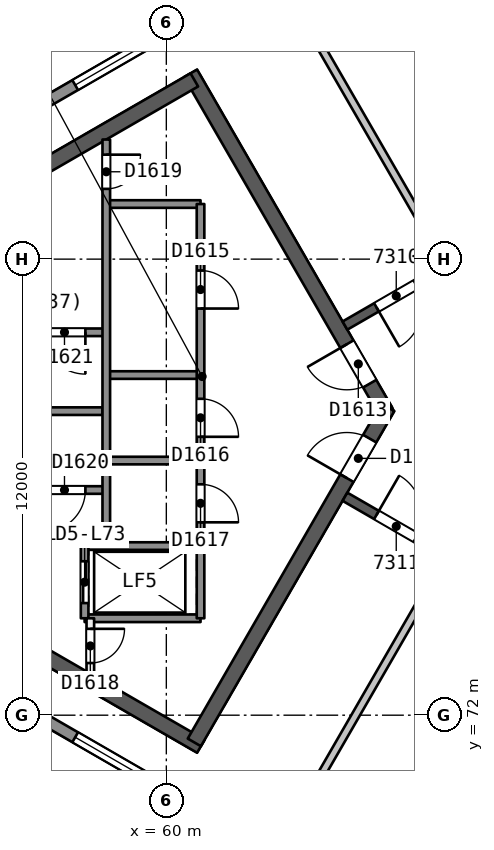
"""IFC4 building model, lengths in metres.
Left out: names, types, materials, properties, quantities, classifications, styles, units other than length and angle.
Written with IfcOpenShell. Run it as: python <this file> out.ifc"""

import sys

from ifc_helpers import new_model, si_unit, direction, frame, frame_2d, origin, place, context, subcontext, project, spatial, rectangle, extrude, element, fill, save


model = new_model("IFC4")
c1 = context("Model", 3, precision=1e-05, world=origin(), true_north=direction((0.0, 1.0)))
c2 = subcontext(c1, "Body", "Model", "MODEL_VIEW")
j1 = project(units=[si_unit("LENGTHUNIT", "METRE"), si_unit("PLANEANGLEUNIT", "RADIAN")], contexts=[c1])
p1 = place(None, origin())
s1 = spatial("IfcSite", under=j1, at=p1, CompositionType="ELEMENT")
p2 = place(p1, origin())
s2 = spatial("IfcBuilding", under=s1, at=p2, CompositionType="ELEMENT")
p3 = place(p2, frame((0.0, 0.0, 296.0)))
s3 = spatial("IfcBuildingStorey", under=s2, at=p3, CompositionType="ELEMENT", Elevation=296.0)
p4 = place(p3, frame((65.769, 80.0, 0.0), z_axis=(0.0, 0.0, 1.0), x_axis=(-0.50000177223, 0.866024380585, 0.0)))
e1 = element("IfcWall", 1, at=p4, inside=s3, PredefinedType="SHEAR", context=c2, shape_type="SweptSolid", body=[
    extrude(rectangle(XDim=10.265, YDim=0.4, at=frame_2d((5.132, 0.0))), origin(), (0.0, 0.0, 1.0), 4.4),
])
p5 = place(p4, frame((0.834, 0.0, 0.0)))
e2 = element("IfcOpeningElement", 2, at=p5, cuts=e1, PredefinedType="OPENING", context=c2, shape_type="SweptSolid", body=[
    extrude(rectangle(XDim=1.2, YDim=2.1, at=frame_2d((0.6, 1.05))), frame((0.0, 0.21, 0.0), z_axis=(0.0, -1.0, 0.0), x_axis=(1.0, 0.0, 0.0)), (0.0, 0.0, 1.0), 0.421),
])
p6 = place(p3, frame((60.737, 88.716, 0.0), z_axis=(0.0, 0.0, 1.0), x_axis=(-0.866028812667, -0.499994095595, 0.0)))
e3 = element("IfcWall", 3, at=p6, inside=s3, PredefinedType="SHEAR", context=c2, shape_type="SweptSolid", body=[
    extrude(rectangle(XDim=14.134, YDim=0.4, at=frame_2d((7.067, 0.0))), origin(), (0.0, 0.0, 1.0), 4.4),
])
p7 = place(p3, frame((48.597, 78.293, 0.0), z_axis=(0.0, 0.0, 1.0), x_axis=(0.866026024469, -0.499998924941, 0.0)))
e4 = element("IfcWall", 4, at=p7, inside=s3, PredefinedType="SHEAR", context=c2, shape_type="SweptSolid", body=[
    extrude(rectangle(XDim=14.218, YDim=0.4, at=frame_2d((7.109, 0.0))), origin(), (0.0, 0.0, 1.0), 4.4),
])
p8 = place(p3, frame((60.737, 71.284, 0.0), z_axis=(0.0, 0.0, 1.0), x_axis=(0.50000547566, 0.866022242388, 0.0)))
e5 = element("IfcWall", 5, at=p8, inside=s3, PredefinedType="SHEAR", context=c2, shape_type="SweptSolid", body=[
    extrude(rectangle(XDim=10.18, YDim=0.4, at=frame_2d((5.09, 0.0))), origin(), (0.0, 0.0, 1.0), 4.4),
])
p9 = place(p8, frame((8.03, 0.0, 0.0)))
e6 = element("IfcOpeningElement", 6, at=p9, cuts=e5, PredefinedType="OPENING", context=c2, shape_type="SweptSolid", body=[
    extrude(rectangle(XDim=1.2, YDim=2.1, at=frame_2d((0.6, 1.05))), frame((0.0, 0.21, 0.0), z_axis=(0.0, -1.0, 0.0), x_axis=(1.0, 0.0, 0.0)), (0.0, 0.0, 1.0), 0.421),
])
p10 = place(p3, frame((78.2, 90.046, 0.0), z_axis=(0.0, 0.0, 1.0), x_axis=(-0.866026492143, -0.499998114903, 0.0)))
e7 = element("IfcWall", 7, at=p10, inside=s3, PredefinedType="SHEAR", context=c2, shape_type="SweptSolid", body=[
    extrude(rectangle(XDim=15.588, YDim=0.25, at=frame_2d((7.794, 0.0))), origin(), (0.0, 0.0, 1.0), 4.0),
])
p11 = place(p10, frame((2.518, 0.0, 0.0)))
e8 = element("IfcOpeningElement", 8, at=p11, cuts=e7, PredefinedType="OPENING", context=c2, shape_type="SweptSolid", body=[
    extrude(rectangle(XDim=1.2, YDim=2.4, at=frame_2d((0.6, 1.2))), frame((0.0, 0.135, 0.0), z_axis=(0.0, -1.0, 0.0), x_axis=(1.0, 0.0, 0.0)), (0.0, 0.0, 1.0), 0.271),
])
p12 = place(p10, frame((7.194, 0.0, 0.0)))
e9 = element("IfcOpeningElement", 9, at=p12, cuts=e7, PredefinedType="OPENING", context=c2, shape_type="SweptSolid", body=[
    extrude(rectangle(XDim=1.2, YDim=2.4, at=frame_2d((0.6, 1.2))), frame((0.0, 0.135, 0.0), z_axis=(0.0, -1.0, 0.0), x_axis=(1.0, 0.0, 0.0)), (0.0, 0.0, 1.0), 0.271),
])
p13 = place(p10, frame((10.312, 0.0, 0.0)))
e10 = element("IfcOpeningElement", 10, at=p13, cuts=e7, PredefinedType="OPENING", context=c2, shape_type="SweptSolid", body=[
    extrude(rectangle(XDim=1.2, YDim=2.4, at=frame_2d((0.6, 1.2))), frame((0.0, 0.135, 0.0), z_axis=(0.0, -1.0, 0.0), x_axis=(1.0, 0.0, 0.0)), (0.0, 0.0, 1.0), 0.271),
])
p14 = place(p10, frame((13.43, 0.0, 0.0)))
e11 = element("IfcOpeningElement", 11, at=p14, cuts=e7, PredefinedType="OPENING", context=c2, shape_type="SweptSolid", body=[
    extrude(rectangle(XDim=1.2, YDim=2.4, at=frame_2d((0.6, 1.2))), frame((0.0, 0.135, 0.0), z_axis=(0.0, -1.0, 0.0), x_axis=(1.0, 0.0, 0.0)), (0.0, 0.0, 1.0), 0.271),
])
p15 = place(p3, frame((64.7, 77.748, 0.0), z_axis=(0.0, 0.0, 1.0), x_axis=(0.866026492143, -0.499998114903, 0.0)))
e12 = element("IfcWall", 12, at=p15, inside=s3, PredefinedType="SHEAR", context=c2, shape_type="SweptSolid", body=[
    extrude(rectangle(XDim=15.588, YDim=0.25, at=frame_2d((7.794, 0.0))), origin(), (0.0, 0.0, 1.0), 4.0),
])
p16 = place(p15, frame((0.959, 0.0, 0.0)))
e13 = element("IfcOpeningElement", 13, at=p16, cuts=e12, PredefinedType="OPENING", context=c2, shape_type="SweptSolid", body=[
    extrude(rectangle(XDim=1.2, YDim=2.4, at=frame_2d((0.6, 1.2))), frame((0.0, 0.135, 0.0), z_axis=(0.0, -1.0, 0.0), x_axis=(1.0, 0.0, 0.0)), (0.0, 0.0, 1.0), 0.271),
])
p17 = place(p15, frame((4.076, 0.0, 0.0)))
e14 = element("IfcOpeningElement", 14, at=p17, cuts=e12, PredefinedType="OPENING", context=c2, shape_type="SweptSolid", body=[
    extrude(rectangle(XDim=1.2, YDim=2.4, at=frame_2d((0.6, 1.2))), frame((0.0, 0.135, 0.0), z_axis=(0.0, -1.0, 0.0), x_axis=(1.0, 0.0, 0.0)), (0.0, 0.0, 1.0), 0.271),
])
p18 = place(p15, frame((8.753, 0.0, 0.0)))
e15 = element("IfcOpeningElement", 15, at=p18, cuts=e12, PredefinedType="OPENING", context=c2, shape_type="SweptSolid", body=[
    extrude(rectangle(XDim=1.2, YDim=2.4, at=frame_2d((0.6, 1.2))), frame((0.0, 0.135, 0.0), z_axis=(0.0, -1.0, 0.0), x_axis=(1.0, 0.0, 0.0)), (0.0, 0.0, 1.0), 0.271),
])
p19 = place(p15, frame((13.43, 0.0, 0.0)))
e16 = element("IfcOpeningElement", 16, at=p19, cuts=e12, PredefinedType="OPENING", context=c2, shape_type="SweptSolid", body=[
    extrude(rectangle(XDim=1.2, YDim=2.4, at=frame_2d((0.6, 1.2))), frame((0.0, 0.135, 0.0), z_axis=(0.0, -1.0, 0.0), x_axis=(1.0, 0.0, 0.0)), (0.0, 0.0, 1.0), 0.271),
])
p20 = place(p3, frame((65.66, 93.06, 0.0), z_axis=(0.0, 0.0, 1.0), x_axis=(0.50000642917, -0.866021691869, 0.0)))
e17 = element("IfcWall", 17, at=p20, inside=s3, PredefinedType="PARTITIONING", context=c2, shape_type="SweptSolid", body=[
    extrude(rectangle(XDim=8.881, YDim=0.2, at=frame_2d((4.44, 0.0))), origin(), (0.0, 0.0, 1.0), 4.0),
])
for number, where, z_axis, x_axis in (
    (18, (62.96, 91.501, 0.0), (0.0, 0.0, 1.0), (0.5, -0.866, 0.0)),
    (19, (62.96, 68.499, 0.0), (0.0, 0.0, 1.0), (0.5, 0.866, 0.0)),
):
    element("IfcWall", number, at=place(p3, frame(where, z_axis=z_axis, x_axis=x_axis)), inside=s3, PredefinedType="PARTITIONING", context=c2, shape_type="SweptSolid", body=[
        extrude(rectangle(XDim=8.881, YDim=0.2, at=frame_2d((4.44, 0.0))), origin(), (0.0, 0.0, 1.0), 4.0),
    ])
p21 = place(p3, frame((65.66, 66.94, 0.0), z_axis=(0.0, 0.0, 1.0), x_axis=(0.50000642917, 0.866021691869, 0.0)))
e20 = element("IfcWall", 20, at=p21, inside=s3, PredefinedType="PARTITIONING", context=c2, shape_type="SweptSolid", body=[
    extrude(rectangle(XDim=8.881, YDim=0.2, at=frame_2d((4.44, 0.0))), origin(), (0.0, 0.0, 1.0), 4.0),
])
p22 = place(p3, frame((46.849, 82.372, 0.0), z_axis=(0.0, 0.0, 1.0), x_axis=(0.86602624246, 0.499998547369, 0.0)))
e21 = element("IfcWall", 21, at=p22, inside=s3, PredefinedType="SOLIDWALL", context=c2, shape_type="SweptSolid", body=[
    extrude(rectangle(XDim=46.386, YDim=0.3, at=frame_2d((23.193, 0.0))), origin(), (0.0, 0.0, 1.0), 4.0),
])
p23 = place(p22, frame((3.139, 0.0, 0.6)))
e22 = element("IfcOpeningElement", 22, at=p23, cuts=e21, PredefinedType="OPENING", context=c2, shape_type="SweptSolid", body=[
    extrude(rectangle(XDim=3.0, YDim=2.4, at=frame_2d((1.5, 1.2))), frame((0.0, 0.161, 0.0), z_axis=(0.0, -1.0, 0.0), x_axis=(1.0, 0.0, 0.0)), (0.0, 0.0, 1.0), 0.321),
])
p24 = place(p22, frame((12.416, 0.0, 0.6)))
e23 = element("IfcOpeningElement", 23, at=p24, cuts=e21, PredefinedType="OPENING", context=c2, shape_type="SweptSolid", body=[
    extrude(rectangle(XDim=3.0, YDim=2.4, at=frame_2d((1.5, 1.2))), frame((0.0, 0.161, 0.0), z_axis=(0.0, -1.0, 0.0), x_axis=(1.0, 0.0, 0.0)), (0.0, 0.0, 1.0), 0.321),
])
p25 = place(p22, frame((21.693, 0.0, 0.6)))
e24 = element("IfcOpeningElement", 24, at=p25, cuts=e21, PredefinedType="OPENING", context=c2, shape_type="SweptSolid", body=[
    extrude(rectangle(XDim=3.0, YDim=2.4, at=frame_2d((1.5, 1.2))), frame((0.0, 0.161, 0.0), z_axis=(0.0, -1.0, 0.0), x_axis=(1.0, 0.0, 0.0)), (0.0, 0.0, 1.0), 0.321),
])
p26 = place(p22, frame((30.97, 0.0, 0.6)))
e25 = element("IfcOpeningElement", 25, at=p26, cuts=e21, PredefinedType="OPENING", context=c2, shape_type="SweptSolid", body=[
    extrude(rectangle(XDim=3.0, YDim=2.4, at=frame_2d((1.5, 1.2))), frame((0.0, 0.161, 0.0), z_axis=(0.0, -1.0, 0.0), x_axis=(1.0, 0.0, 0.0)), (0.0, 0.0, 1.0), 0.321),
])
p27 = place(p22, frame((40.247, 0.0, 0.6)))
e26 = element("IfcOpeningElement", 26, at=p27, cuts=e21, PredefinedType="OPENING", context=c2, shape_type="SweptSolid", body=[
    extrude(rectangle(XDim=3.0, YDim=2.4, at=frame_2d((1.5, 1.2))), frame((0.0, 0.161, 0.0), z_axis=(0.0, -1.0, 0.0), x_axis=(1.0, 0.0, 0.0)), (0.0, 0.0, 1.0), 0.321),
])
p28 = place(p3, frame((87.021, 54.435, 0.0), z_axis=(0.0, 0.0, 1.0), x_axis=(-0.86602624246, 0.499998547369, 0.0)))
e27 = element("IfcWall", 27, at=p28, inside=s3, PredefinedType="SOLIDWALL", context=c2, shape_type="SweptSolid", body=[
    extrude(rectangle(XDim=46.386, YDim=0.3, at=frame_2d((23.193, 0.0))), origin(), (0.0, 0.0, 1.0), 4.0),
])
p29 = place(p28, frame((3.139, 0.0, 0.6)))
e28 = element("IfcOpeningElement", 28, at=p29, cuts=e27, PredefinedType="OPENING", context=c2, shape_type="SweptSolid", body=[
    extrude(rectangle(XDim=3.0, YDim=2.4, at=frame_2d((1.5, 1.2))), frame((0.0, 0.161, 0.0), z_axis=(0.0, -1.0, 0.0), x_axis=(1.0, 0.0, 0.0)), (0.0, 0.0, 1.0), 0.321),
])
p30 = place(p28, frame((12.416, 0.0, 0.6)))
e29 = element("IfcOpeningElement", 29, at=p30, cuts=e27, PredefinedType="OPENING", context=c2, shape_type="SweptSolid", body=[
    extrude(rectangle(XDim=3.0, YDim=2.4, at=frame_2d((1.5, 1.2))), frame((0.0, 0.161, 0.0), z_axis=(0.0, -1.0, 0.0), x_axis=(1.0, 0.0, 0.0)), (0.0, 0.0, 1.0), 0.321),
])
p31 = place(p28, frame((21.693, 0.0, 0.6)))
e30 = element("IfcOpeningElement", 30, at=p31, cuts=e27, PredefinedType="OPENING", context=c2, shape_type="SweptSolid", body=[
    extrude(rectangle(XDim=3.0, YDim=2.4, at=frame_2d((1.5, 1.2))), frame((0.0, 0.161, 0.0), z_axis=(0.0, -1.0, 0.0), x_axis=(1.0, 0.0, 0.0)), (0.0, 0.0, 1.0), 0.321),
])
p32 = place(p28, frame((30.97, 0.0, 0.6)))
e31 = element("IfcOpeningElement", 31, at=p32, cuts=e27, PredefinedType="OPENING", context=c2, shape_type="SweptSolid", body=[
    extrude(rectangle(XDim=3.0, YDim=2.4, at=frame_2d((1.5, 1.2))), frame((0.0, 0.161, 0.0), z_axis=(0.0, -1.0, 0.0), x_axis=(1.0, 0.0, 0.0)), (0.0, 0.0, 1.0), 0.321),
])
p33 = place(p28, frame((40.247, 0.0, 0.6)))
e32 = element("IfcOpeningElement", 32, at=p33, cuts=e27, PredefinedType="OPENING", context=c2, shape_type="SweptSolid", body=[
    extrude(rectangle(XDim=3.0, YDim=2.4, at=frame_2d((1.5, 1.2))), frame((0.0, 0.161, 0.0), z_axis=(0.0, -1.0, 0.0), x_axis=(1.0, 0.0, 0.0)), (0.0, 0.0, 1.0), 0.321),
])
p34 = place(p3, frame((60.9, 85.45, 0.0), z_axis=(0.0, 0.0, 1.0), x_axis=(-1.0, 0.0, 0.0)))
e33 = element("IfcWall", 33, at=p34, inside=s3, PredefinedType="SOLIDWALL", context=c2, shape_type="SweptSolid", body=[
    extrude(rectangle(XDim=2.48, YDim=0.2, at=frame_2d((1.24, 0.0))), origin(), (0.0, 0.0, 1.0), 4.0),
])
p35 = place(p3, frame((58.42, 82.075, 0.0), z_axis=(0.0, 0.0, 1.0), x_axis=(-1.0, 0.0, 0.0)))
e34 = element("IfcWall", 34, at=p35, inside=s3, PredefinedType="SOLIDWALL", context=c2, shape_type="SweptSolid", body=[
    extrude(rectangle(XDim=7.7, YDim=0.2, at=frame_2d((3.85, 0.0))), origin(), (0.0, 0.0, 1.0), 4.0),
])
p36 = place(p35, frame((0.55, 0.0, 0.0)))
e35 = element("IfcOpeningElement", 35, at=p36, cuts=e34, PredefinedType="OPENING", context=c2, shape_type="SweptSolid", body=[
    extrude(rectangle(XDim=1.1, YDim=2.1, at=frame_2d((0.55, 1.05))), frame((0.0, 0.11, 0.0), z_axis=(0.0, -1.0, 0.0), x_axis=(1.0, 0.0, 0.0)), (0.0, 0.0, 1.0), 0.221),
])
p37 = place(p3, frame((60.9, 80.95, 0.0), z_axis=(0.0, 0.0, 1.0), x_axis=(-1.0, 0.0, 0.0)))
e36 = element("IfcWall", 36, at=p37, inside=s3, PredefinedType="SOLIDWALL", context=c2, shape_type="SweptSolid", body=[
    extrude(rectangle(XDim=2.48, YDim=0.2, at=frame_2d((1.24, 0.0))), origin(), (0.0, 0.0, 1.0), 4.0),
])
p38 = place(p3, frame((58.32, 80.0, 0.0), z_axis=(0.0, 0.0, 1.0), x_axis=(-1.0, 0.0, 0.0)))
e37 = element("IfcWall", 37, at=p38, inside=s3, PredefinedType="SOLIDWALL", context=c2, shape_type="SweptSolid", body=[
    extrude(rectangle(XDim=2.2, YDim=0.2, at=frame_2d((1.1, 0.0))), origin(), (0.0, 0.0, 1.0), 4.0),
])
p39 = place(p3, frame((60.9, 78.7, 0.0), z_axis=(0.0, 0.0, 1.0), x_axis=(-1.0, 0.0, 0.0)))
e38 = element("IfcWall", 38, at=p39, inside=s3, PredefinedType="SOLIDWALL", context=c2, shape_type="SweptSolid", body=[
    extrude(rectangle(XDim=2.48, YDim=0.2, at=frame_2d((1.24, 0.0))), origin(), (0.0, 0.0, 1.0), 4.0),
])
p40 = place(p3, frame((58.42, 77.925, 0.0), z_axis=(0.0, 0.0, 1.0), x_axis=(-1.0, 0.0, 0.0)))
e39 = element("IfcWall", 39, at=p40, inside=s3, PredefinedType="SOLIDWALL", context=c2, shape_type="SweptSolid", body=[
    extrude(rectangle(XDim=7.7, YDim=0.2, at=frame_2d((3.85, 0.0))), origin(), (0.0, 0.0, 1.0), 4.0),
])
p41 = place(p40, frame((0.55, 0.0, 0.0)))
e40 = element("IfcOpeningElement", 40, at=p41, cuts=e39, PredefinedType="OPENING", context=c2, shape_type="SweptSolid", body=[
    extrude(rectangle(XDim=1.1, YDim=2.1, at=frame_2d((0.55, 1.05))), frame((0.0, 0.11, 0.0), z_axis=(0.0, -1.0, 0.0), x_axis=(1.0, 0.0, 0.0)), (0.0, 0.0, 1.0), 0.221),
])
for number, where, z_axis, x_axis in (
    (41, (60.9, 76.45, 0.0), (0.0, 0.0, 1.0), (-1.0, 0.0, 0.0)),
    (42, (60.9, 74.55, 0.0), (0.0, 0.0, 1.0), (-1.0, 0.0, 0.0)),
):
    element("IfcWall", number, at=place(p3, frame(where, z_axis=z_axis, x_axis=x_axis)), inside=s3, PredefinedType="SOLIDWALL", context=c2, shape_type="SweptSolid", body=[
        extrude(rectangle(XDim=3.05, YDim=0.2, at=frame_2d((1.525, 0.0))), origin(), (0.0, 0.0, 1.0), 4.0),
    ])
p42 = place(p3, frame((60.9, 85.45, 0.0), z_axis=(0.0, 0.0, 1.0), x_axis=(0.0, -1.0, 0.0)))
e43 = element("IfcWall", 43, at=p42, inside=s3, PredefinedType="SOLIDWALL", context=c2, shape_type="SweptSolid", body=[
    extrude(rectangle(XDim=10.9, YDim=0.2, at=frame_2d((5.45, 0.0))), origin(), (0.0, 0.0, 1.0), 4.0),
])
p43 = place(p42, frame((1.75, 0.0, 0.0)))
e44 = element("IfcOpeningElement", 44, at=p43, cuts=e43, PredefinedType="OPENING", context=c2, shape_type="SweptSolid", body=[
    extrude(rectangle(XDim=1.0, YDim=2.1, at=frame_2d((0.5, 1.05))), frame((0.0, 0.11, 0.0), z_axis=(0.0, -1.0, 0.0), x_axis=(1.0, 0.0, 0.0)), (0.0, 0.0, 1.0), 0.221),
])
p44 = place(p42, frame((5.125, 0.0, 0.0)))
e45 = element("IfcOpeningElement", 45, at=p44, cuts=e43, PredefinedType="OPENING", context=c2, shape_type="SweptSolid", body=[
    extrude(rectangle(XDim=1.0, YDim=2.1, at=frame_2d((0.5, 1.05))), frame((0.0, 0.11, 0.0), z_axis=(0.0, -1.0, 0.0), x_axis=(1.0, 0.0, 0.0)), (0.0, 0.0, 1.0), 0.221),
])
p45 = place(p42, frame((7.375, 0.0, 0.0)))
e46 = element("IfcOpeningElement", 46, at=p45, cuts=e43, PredefinedType="OPENING", context=c2, shape_type="SweptSolid", body=[
    extrude(rectangle(XDim=1.0, YDim=2.1, at=frame_2d((0.5, 1.05))), frame((0.0, 0.11, 0.0), z_axis=(0.0, -1.0, 0.0), x_axis=(1.0, 0.0, 0.0)), (0.0, 0.0, 1.0), 0.221),
])
p46 = place(p3, frame((58.42, 87.148, 0.0), z_axis=(0.0, 0.0, 1.0), x_axis=(0.0, -1.0, 0.0)))
e47 = element("IfcWall", 47, at=p46, inside=s3, PredefinedType="SOLIDWALL", context=c2, shape_type="SweptSolid", body=[
    extrude(rectangle(XDim=10.698, YDim=0.2, at=frame_2d((5.349, 0.0))), origin(), (0.0, 0.0, 1.0), 4.0),
])
p47 = place(p46, frame((0.399, 0.0, 0.0)))
e48 = element("IfcOpeningElement", 48, at=p47, cuts=e47, PredefinedType="OPENING", context=c2, shape_type="SweptSolid", body=[
    extrude(rectangle(XDim=0.9, YDim=2.1, at=frame_2d((0.45, 1.05))), frame((0.0, 0.11, 0.0), z_axis=(0.0, -1.0, 0.0), x_axis=(1.0, 0.0, 0.0)), (0.0, 0.0, 1.0), 0.221),
])
p48 = place(p3, frame((58.0, 74.55, 0.0), z_axis=(0.0, 0.0, 1.0), x_axis=(0.0, -1.0, 0.0)))
e49 = element("IfcWall", 49, at=p48, inside=s3, PredefinedType="PARTITIONING", context=c2, shape_type="SweptSolid", body=[
    extrude(rectangle(XDim=1.455, YDim=0.2, at=frame_2d((0.728, 0.0))), origin(), (0.0, 0.0, 1.0), 4.0),
])
p49 = place(p48, frame((0.278, 0.0, 0.0)))
e50 = element("IfcOpeningElement", 50, at=p49, cuts=e49, PredefinedType="OPENING", context=c2, shape_type="SweptSolid", body=[
    extrude(rectangle(XDim=0.9, YDim=2.1, at=frame_2d((0.45, 1.05))), frame((0.0, 0.11, 0.0), z_axis=(0.0, -1.0, 0.0), x_axis=(1.0, 0.0, 0.0)), (0.0, 0.0, 1.0), 0.221),
])
p50 = place(p3, frame((57.85, 76.45, 0.0), z_axis=(0.0, 0.0, 1.0), x_axis=(0.0, -1.0, 0.0)))
e51 = element("IfcWall", 51, at=p50, inside=s3, PredefinedType="SOLIDWALL", context=c2, shape_type="SweptSolid", body=[
    extrude(rectangle(XDim=1.9, YDim=0.2, at=frame_2d((0.95, 0.0))), origin(), (0.0, 0.0, 1.0), 4.0),
])
p51 = place(p50, frame((0.4, 0.0, 0.0)))
e52 = element("IfcOpeningElement", 52, at=p51, cuts=e51, PredefinedType="OPENING", context=c2, shape_type="SweptSolid", body=[
    extrude(rectangle(XDim=1.1, YDim=2.1, at=frame_2d((0.55, 1.05))), frame((0.0, 0.11, 0.0), z_axis=(0.0, -1.0, 0.0), x_axis=(1.0, 0.0, 0.0)), (0.0, 0.0, 1.0), 0.221),
])
p52 = place(p14, origin())
e53 = element("IfcDoor", 53, at=p52, inside=s3, OperationType="SINGLE_SWING_RIGHT", PredefinedType="NOTDEFINED", context=c2, shape_type="SweptSolid", body=[
    extrude(rectangle(XDim=1.2, YDim=2.4, at=frame_2d((0.6, 1.2))), frame((0.0, 0.025, 0.0), z_axis=(0.0, -1.0, 0.0), x_axis=(1.0, 0.0, 0.0)), (0.0, 0.0, 1.0), 0.05),
])
fill(e11, e53)
p53 = place(p16, origin())
e54 = element("IfcDoor", 54, at=p53, inside=s3, OperationType="SINGLE_SWING_LEFT", PredefinedType="NOTDEFINED", context=c2, shape_type="SweptSolid", body=[
    extrude(rectangle(XDim=1.2, YDim=2.4, at=frame_2d((0.6, 1.2))), frame((0.0, 0.025, 0.0), z_axis=(0.0, -1.0, 0.0), x_axis=(1.0, 0.0, 0.0)), (0.0, 0.0, 1.0), 0.05),
])
fill(e13, e54)
p54 = place(p24, origin())
e55 = element("IfcWindow", 55, at=p54, inside=s3, PartitioningType="SINGLE_PANEL", PredefinedType="WINDOW", context=c2, shape_type="SweptSolid", body=[
    extrude(rectangle(XDim=3.0, YDim=2.4, at=frame_2d((1.5, 1.2))), frame((0.0, 0.03, 0.0), z_axis=(0.0, -1.0, 0.0), x_axis=(1.0, 0.0, 0.0)), (0.0, 0.0, 1.0), 0.06),
])
fill(e23, e55)
p55 = place(p32, origin())
e56 = element("IfcWindow", 56, at=p55, inside=s3, PartitioningType="SINGLE_PANEL", PredefinedType="WINDOW", context=c2, shape_type="SweptSolid", body=[
    extrude(rectangle(XDim=3.0, YDim=2.4, at=frame_2d((1.5, 1.2))), frame((0.0, 0.03, 0.0), z_axis=(0.0, -1.0, 0.0), x_axis=(1.0, 0.0, 0.0)), (0.0, 0.0, 1.0), 0.06),
])
fill(e31, e56)
p56 = place(p5, origin())
e57 = element("IfcDoor", 57, at=p56, inside=s3, OperationType="SINGLE_SWING_RIGHT", PredefinedType="NOTDEFINED", context=c2, shape_type="SweptSolid", body=[
    extrude(rectangle(XDim=1.2, YDim=2.1, at=frame_2d((0.6, 1.05))), frame((0.0, 0.025, 0.0), z_axis=(0.0, -1.0, 0.0), x_axis=(1.0, 0.0, 0.0)), (0.0, 0.0, 1.0), 0.05),
])
fill(e2, e57)
p57 = place(p9, origin())
e58 = element("IfcDoor", 58, at=p57, inside=s3, OperationType="SINGLE_SWING_LEFT", PredefinedType="NOTDEFINED", context=c2, shape_type="SweptSolid", body=[
    extrude(rectangle(XDim=1.2, YDim=2.1, at=frame_2d((0.6, 1.05))), frame((0.0, 0.025, 0.0), z_axis=(0.0, -1.0, 0.0), x_axis=(1.0, 0.0, 0.0)), (0.0, 0.0, 1.0), 0.05),
])
fill(e6, e58)
p58 = place(p51, origin())
e59 = element("IfcDoor", 59, at=p58, inside=s3, OperationType="SLIDING_TO_RIGHT", PredefinedType="NOTDEFINED", context=c2, shape_type="SweptSolid", body=[
    extrude(rectangle(XDim=1.1, YDim=2.1, at=frame_2d((0.55, 1.05))), frame((0.0, 0.025, 0.0), z_axis=(0.0, -1.0, 0.0), x_axis=(1.0, 0.0, 0.0)), (0.0, 0.0, 1.0), 0.05),
])
fill(e52, e59)
p59 = place(p43, origin())
e60 = element("IfcDoor", 60, at=p59, inside=s3, OperationType="SINGLE_SWING_RIGHT", PredefinedType="NOTDEFINED", context=c2, shape_type="SweptSolid", body=[
    extrude(rectangle(XDim=1.0, YDim=2.1, at=frame_2d((0.5, 1.05))), frame((0.0, 0.025, 0.0), z_axis=(0.0, -1.0, 0.0), x_axis=(1.0, 0.0, 0.0)), (0.0, 0.0, 1.0), 0.05),
])
fill(e44, e60)
p60 = place(p44, origin())
e61 = element("IfcDoor", 61, at=p60, inside=s3, OperationType="SINGLE_SWING_RIGHT", PredefinedType="NOTDEFINED", context=c2, shape_type="SweptSolid", body=[
    extrude(rectangle(XDim=1.0, YDim=2.1, at=frame_2d((0.5, 1.05))), frame((0.0, 0.025, 0.0), z_axis=(0.0, -1.0, 0.0), x_axis=(1.0, 0.0, 0.0)), (0.0, 0.0, 1.0), 0.05),
])
fill(e45, e61)
p61 = place(p45, origin())
e62 = element("IfcDoor", 62, at=p61, inside=s3, OperationType="SINGLE_SWING_RIGHT", PredefinedType="NOTDEFINED", context=c2, shape_type="SweptSolid", body=[
    extrude(rectangle(XDim=1.0, YDim=2.1, at=frame_2d((0.5, 1.05))), frame((0.0, 0.025, 0.0), z_axis=(0.0, -1.0, 0.0), x_axis=(1.0, 0.0, 0.0)), (0.0, 0.0, 1.0), 0.05),
])
fill(e46, e62)
p62 = place(p49, origin())
e63 = element("IfcDoor", 63, at=p62, inside=s3, OperationType="SINGLE_SWING_LEFT", PredefinedType="NOTDEFINED", context=c2, shape_type="SweptSolid", body=[
    extrude(rectangle(XDim=0.9, YDim=2.1, at=frame_2d((0.45, 1.05))), frame((0.0, 0.025, 0.0), z_axis=(0.0, -1.0, 0.0), x_axis=(1.0, 0.0, 0.0)), (0.0, 0.0, 1.0), 0.05),
])
fill(e50, e63)
p63 = place(p47, origin())
e64 = element("IfcDoor", 64, at=p63, inside=s3, OperationType="SINGLE_SWING_LEFT", PredefinedType="NOTDEFINED", context=c2, shape_type="SweptSolid", body=[
    extrude(rectangle(XDim=0.9, YDim=2.1, at=frame_2d((0.45, 1.05))), frame((0.0, 0.025, 0.0), z_axis=(0.0, -1.0, 0.0), x_axis=(1.0, 0.0, 0.0)), (0.0, 0.0, 1.0), 0.05),
])
fill(e48, e64)
p64 = place(p41, origin())
e65 = element("IfcDoor", 65, at=p64, inside=s3, OperationType="SINGLE_SWING_RIGHT", PredefinedType="NOTDEFINED", context=c2, shape_type="SweptSolid", body=[
    extrude(rectangle(XDim=1.1, YDim=2.1, at=frame_2d((0.55, 1.05))), frame((0.0, 0.025, 0.0), z_axis=(0.0, -1.0, 0.0), x_axis=(1.0, 0.0, 0.0)), (0.0, 0.0, 1.0), 0.05),
])
fill(e40, e65)
p65 = place(p36, origin())
e66 = element("IfcDoor", 66, at=p65, inside=s3, OperationType="SINGLE_SWING_LEFT", PredefinedType="NOTDEFINED", context=c2, shape_type="SweptSolid", body=[
    extrude(rectangle(XDim=1.1, YDim=2.1, at=frame_2d((0.55, 1.05))), frame((0.0, 0.025, 0.0), z_axis=(0.0, -1.0, 0.0), x_axis=(1.0, 0.0, 0.0)), (0.0, 0.0, 1.0), 0.05),
])
fill(e35, e66)
save(model, sys.argv[1])
